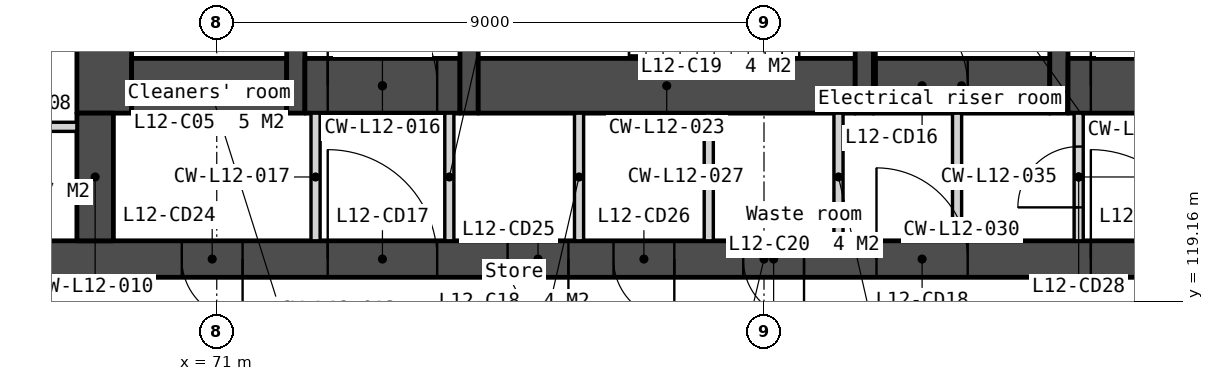
"""IFC4 building model, lengths in metres.
Left out: names, types, materials, properties, quantities, classifications, styles, units other than length and angle.
Written with IfcOpenShell. Run it as: python <this file> out.ifc"""

import sys

from ifc_helpers import new_model, si_unit, direction, frame, frame_2d, origin, place, context, subcontext, project, spatial, polyline, rectangle, outline, extrude, element, fill, save


model = new_model("IFC4")
c1 = context("Model", 3, precision=1e-05, world=origin(), true_north=direction((0.0, 1.0)))
c2 = subcontext(c1, "Body", "Model", "MODEL_VIEW")
j1 = project(units=[si_unit("LENGTHUNIT", "METRE"), si_unit("PLANEANGLEUNIT", "RADIAN")], contexts=[c1])
p1 = place(None, origin())
s1 = spatial("IfcSite", under=j1, at=p1, CompositionType="ELEMENT")
p2 = place(p1, origin())
s2 = spatial("IfcBuilding", under=s1, at=p2, CompositionType="ELEMENT")
p3 = place(p2, frame((0.0, 0.0, 56.0)))
s3 = spatial("IfcBuildingStorey", under=s2, at=p3, CompositionType="ELEMENT", Elevation=56.0)
p4 = place(p3, frame((66.0, 119.85, 0.0), z_axis=(0.0, 0.0, 1.0), x_axis=(1.0, 0.0, 0.0)))
e1 = element("IfcWall", 1, at=p4, inside=s3, PredefinedType="SOLIDWALL", context=c2, shape_type="SweptSolid", body=[
    extrude(rectangle(XDim=28.0, YDim=0.6, at=frame_2d((14.0, 0.0))), origin(), (0.0, 0.0, 1.0), 3.35),
])
p5 = place(p4, frame((6.825, 0.0, 0.0)))
e2 = element("IfcOpeningElement", 2, at=p5, cuts=e1, PredefinedType="OPENING", context=c2, shape_type="SweptSolid", body=[
    extrude(rectangle(XDim=1.8, YDim=2.1, at=frame_2d((0.9, 1.05))), frame((0.0, 0.31, 0.0), z_axis=(0.0, -1.0, 0.0), x_axis=(1.0, 0.0, 0.0)), (0.0, 0.0, 1.0), 0.62),
])
p6 = place(p4, frame((15.85, 0.0, 0.0)))
e3 = element("IfcOpeningElement", 3, at=p6, cuts=e1, PredefinedType="OPENING", context=c2, shape_type="SweptSolid", body=[
    extrude(rectangle(XDim=1.5, YDim=2.1, at=frame_2d((0.75, 1.05))), frame((0.0, 0.31, 0.0), z_axis=(0.0, -1.0, 0.0), x_axis=(1.0, 0.0, 0.0)), (0.0, 0.0, 1.0), 0.62),
])
p7 = place(p4, frame((19.375, 0.0, 0.0)))
e4 = element("IfcOpeningElement", 4, at=p7, cuts=e1, PredefinedType="OPENING", context=c2, shape_type="SweptSolid", body=[
    extrude(rectangle(XDim=1.8, YDim=2.1, at=frame_2d((0.9, 1.05))), frame((0.0, 0.31, 0.0), z_axis=(0.0, -1.0, 0.0), x_axis=(1.0, 0.0, 0.0)), (0.0, 0.0, 1.0), 0.62),
])
p8 = place(p4, frame((4.425, 0.0, 0.0)))
e5 = element("IfcOpeningElement", 5, at=p8, cuts=e1, PredefinedType="OPENING", context=c2, shape_type="SweptSolid", body=[
    extrude(rectangle(XDim=1.0, YDim=2.1, at=frame_2d((0.5, 1.05))), frame((0.0, 0.31, 0.0), z_axis=(0.0, -1.0, 0.0), x_axis=(1.0, 0.0, 0.0)), (0.0, 0.0, 1.0), 0.62),
])
p9 = place(p4, frame((9.783, 0.0, 0.0)))
e6 = element("IfcOpeningElement", 6, at=p9, cuts=e1, PredefinedType="OPENING", context=c2, shape_type="SweptSolid", body=[
    extrude(rectangle(XDim=1.0, YDim=2.1, at=frame_2d((0.5, 1.05))), frame((0.0, 0.31, 0.0), z_axis=(0.0, -1.0, 0.0), x_axis=(1.0, 0.0, 0.0)), (0.0, 0.0, 1.0), 0.62),
])
p10 = place(p4, frame((11.525, 0.0, 0.0)))
e7 = element("IfcOpeningElement", 7, at=p10, cuts=e1, PredefinedType="OPENING", context=c2, shape_type="SweptSolid", body=[
    extrude(rectangle(XDim=1.0, YDim=2.1, at=frame_2d((0.5, 1.05))), frame((0.0, 0.31, 0.0), z_axis=(0.0, -1.0, 0.0), x_axis=(1.0, 0.0, 0.0)), (0.0, 0.0, 1.0), 0.62),
])
p11 = place(p4, frame((13.658, 0.0, 0.0)))
e8 = element("IfcOpeningElement", 8, at=p11, cuts=e1, PredefinedType="OPENING", context=c2, shape_type="SweptSolid", body=[
    extrude(rectangle(XDim=1.0, YDim=2.1, at=frame_2d((0.5, 1.05))), frame((0.0, 0.31, 0.0), z_axis=(0.0, -1.0, 0.0), x_axis=(1.0, 0.0, 0.0)), (0.0, 0.0, 1.0), 0.62),
])
p12 = place(p4, frame((21.725, 0.0, 0.0)))
e9 = element("IfcOpeningElement", 9, at=p12, cuts=e1, PredefinedType="OPENING", context=c2, shape_type="SweptSolid", body=[
    extrude(rectangle(XDim=1.0, YDim=2.1, at=frame_2d((0.5, 1.05))), frame((0.0, 0.31, 0.0), z_axis=(0.0, -1.0, 0.0), x_axis=(1.0, 0.0, 0.0)), (0.0, 0.0, 1.0), 0.62),
])
p13 = place(p4, frame((23.425, 0.0, 0.0)))
e10 = element("IfcOpeningElement", 10, at=p13, cuts=e1, PredefinedType="OPENING", context=c2, shape_type="SweptSolid", body=[
    extrude(rectangle(XDim=1.0, YDim=2.1, at=frame_2d((0.5, 1.05))), frame((0.0, 0.31, 0.0), z_axis=(0.0, -1.0, 0.0), x_axis=(1.0, 0.0, 0.0)), (0.0, 0.0, 1.0), 0.62),
])
p14 = place(p3, frame((66.6, 122.025, 0.0), z_axis=(0.0, 0.0, 1.0), x_axis=(1.0, 0.0, 0.0)))
e11 = element("IfcWall", 11, at=p14, inside=s3, PredefinedType="PARTITIONING", context=c2, shape_type="SweptSolid", body=[
    extrude(rectangle(XDim=2.1, YDim=0.15, at=frame_2d((1.05, 0.0))), origin(), (0.0, 0.0, 1.0), 3.35),
])
p15 = place(p3, frame((69.15, 133.95, 0.0), z_axis=(0.0, 0.0, 1.0), x_axis=(0.0, -1.0, 0.0)))
e12 = element("IfcWall", 12, at=p15, inside=s3, PredefinedType="SOLIDWALL", context=c2, shape_type="SweptSolid", body=[
    extrude(rectangle(XDim=11.7, YDim=0.9, at=frame_2d((5.85, 0.0))), origin(), (0.0, 0.0, 1.0), 3.35),
])
p16 = place(p3, frame((69.0, 122.25, 0.0), z_axis=(0.0, 0.0, 1.0), x_axis=(0.0, -1.0, 0.0)))
e13 = element("IfcWall", 13, at=p16, inside=s3, PredefinedType="SOLIDWALL", context=c2, shape_type="SweptSolid", body=[
    extrude(rectangle(XDim=2.1, YDim=0.6, at=frame_2d((1.05, 0.0))), origin(), (0.0, 0.0, 1.0), 3.35),
])
p17 = place(p3, frame((69.6, 122.7, 0.0), z_axis=(0.0, 0.0, 1.0), x_axis=(1.0, 0.0, 0.0)))
e14 = element("IfcWall", 14, at=p17, inside=s3, PredefinedType="SOLIDWALL", context=c2, shape_type="SweptSolid", body=[
    extrude(rectangle(XDim=2.55, YDim=0.9, at=frame_2d((1.275, 0.0))), origin(), (0.0, 0.0, 1.0), 3.35),
])
p18 = place(p3, frame((72.3, 133.95, 0.0), z_axis=(0.0, 0.0, 1.0), x_axis=(0.0, -1.0, 0.0)))
e15 = element("IfcWall", 15, at=p18, inside=s3, PredefinedType="SOLIDWALL", context=c2, shape_type="SweptSolid", body=[
    extrude(rectangle(XDim=11.7, YDim=0.3, at=frame_2d((5.85, 0.0))), origin(), (0.0, 0.0, 1.0), 3.35),
])
p19 = place(p18, frame((6.95, 0.0, 0.0)))
e16 = element("IfcOpeningElement", 16, at=p19, cuts=e15, PredefinedType="OPENING", context=c2, shape_type="SweptSolid", body=[
    extrude(rectangle(XDim=1.1, YDim=2.1, at=frame_2d((0.55, 1.05))), frame((0.0, 0.16, 0.0), z_axis=(0.0, -1.0, 0.0), x_axis=(1.0, 0.0, 0.0)), (0.0, 0.0, 1.0), 0.32),
])
p20 = place(p18, frame((9.35, 0.0, 0.0)))
e17 = element("IfcOpeningElement", 17, at=p20, cuts=e15, PredefinedType="OPENING", context=c2, shape_type="SweptSolid", body=[
    extrude(rectangle(XDim=0.9, YDim=2.1, at=frame_2d((0.45, 1.05))), frame((0.0, 0.16, 0.0), z_axis=(0.0, -1.0, 0.0), x_axis=(1.0, 0.0, 0.0)), (0.0, 0.0, 1.0), 0.32),
])
p21 = place(p18, frame((5.1, 0.0, 0.0)))
e18 = element("IfcOpeningElement", 18, at=p21, cuts=e15, PredefinedType="OPENING", context=c2, shape_type="SweptSolid", body=[
    extrude(rectangle(XDim=1.0, YDim=2.1, at=frame_2d((0.5, 1.05))), frame((0.0, 0.16, 0.0), z_axis=(0.0, -1.0, 0.0), x_axis=(1.0, 0.0, 0.0)), (0.0, 0.0, 1.0), 0.32),
])
p22 = place(p3, frame((72.45, 122.7, 0.0), z_axis=(0.0, 0.0, 1.0), x_axis=(1.0, 0.0, 0.0)))
e19 = element("IfcWall", 19, at=p22, inside=s3, PredefinedType="SOLIDWALL", context=c2, shape_type="SweptSolid", body=[
    extrude(rectangle(XDim=2.55, YDim=0.9, at=frame_2d((1.275, 0.0))), origin(), (0.0, 0.0, 1.0), 3.35),
])
p23 = place(p22, frame((0.375, 0.0, 0.0)))
e20 = element("IfcOpeningElement", 20, at=p23, cuts=e19, PredefinedType="OPENING", context=c2, shape_type="SweptSolid", body=[
    extrude(rectangle(XDim=1.8, YDim=2.1, at=frame_2d((0.9, 1.05))), frame((0.0, 0.46, 0.0), z_axis=(0.0, -1.0, 0.0), x_axis=(1.0, 0.0, 0.0)), (0.0, 0.0, 1.0), 0.92),
])
for number, where, z_axis, x_axis in (
    (21, (72.625, 122.25, 0.0), (0.0, 0.0, 1.0), (0.0, -1.0, 0.0)),
    (22, (74.825, 122.25, 0.0), (0.0, 0.0, 1.0), (0.0, -1.0, 0.0)),
):
    element("IfcWall", number, at=place(p3, frame(where, z_axis=z_axis, x_axis=x_axis)), inside=s3, PredefinedType="PARTITIONING", context=c2, shape_type="SweptSolid", body=[
        extrude(rectangle(XDim=2.1, YDim=0.15, at=frame_2d((1.05, 0.0))), origin(), (0.0, 0.0, 1.0), 3.35),
    ])
p24 = place(p3, frame((75.15, 133.95, 0.0), z_axis=(0.0, 0.0, 1.0), x_axis=(0.0, -1.0, 0.0)))
e23 = element("IfcWall", 23, at=p24, inside=s3, PredefinedType="SOLIDWALL", context=c2, shape_type="SweptSolid", body=[
    extrude(rectangle(XDim=11.7, YDim=0.3, at=frame_2d((5.85, 0.0))), origin(), (0.0, 0.0, 1.0), 3.35),
])
p25 = place(p3, frame((75.3, 122.7, 0.0), z_axis=(0.0, 0.0, 1.0), x_axis=(1.0, 0.0, 0.0)))
e24 = element("IfcWall", 24, at=p25, inside=s3, PredefinedType="SOLIDWALL", context=c2, shape_type="SweptSolid", body=[
    extrude(rectangle(XDim=6.2, YDim=0.9, at=frame_2d((3.1, 0.0))), origin(), (0.0, 0.0, 1.0), 3.35),
])
for number, where, z_axis, x_axis in (
    (25, (76.958, 122.25, 0.0), (0.0, 0.0, 1.0), (0.0, -1.0, 0.0)),
    (26, (79.092, 122.25, 0.0), (0.0, 0.0, 1.0), (0.0, -1.0, 0.0)),
    (27, (81.225, 122.25, 0.0), (0.0, 0.0, 1.0), (0.0, -1.0, 0.0)),
):
    element("IfcWall", number, at=place(p3, frame(where, z_axis=z_axis, x_axis=x_axis)), inside=s3, PredefinedType="PARTITIONING", context=c2, shape_type="SweptSolid", body=[
        extrude(rectangle(XDim=2.1, YDim=0.15, at=frame_2d((1.05, 0.0))), origin(), (0.0, 0.0, 1.0), 3.35),
    ])
p26 = place(p3, frame((81.65, 125.7, 0.0), z_axis=(0.0, 0.0, 1.0), x_axis=(0.0, -1.0, 0.0)))
e28 = element("IfcWall", 28, at=p26, inside=s3, PredefinedType="SOLIDWALL", context=c2, shape_type="SweptSolid", body=[
    extrude(rectangle(XDim=3.45, YDim=0.3, at=frame_2d((1.725, 0.0))), origin(), (0.0, 0.0, 1.0), 3.35),
])
p27 = place(p26, frame((0.75, 0.0, 0.0)))
e29 = element("IfcOpeningElement", 29, at=p27, cuts=e28, PredefinedType="OPENING", context=c2, shape_type="SweptSolid", body=[
    extrude(rectangle(XDim=1.0, YDim=2.1, at=frame_2d((0.5, 1.05))), frame((0.0, 0.16, 0.0), z_axis=(0.0, -1.0, 0.0), x_axis=(1.0, 0.0, 0.0)), (0.0, 0.0, 1.0), 0.32),
])
p28 = place(p3, frame((81.8, 122.7, 0.0), z_axis=(0.0, 0.0, 1.0), x_axis=(1.0, 0.0, 0.0)))
e30 = element("IfcWall", 30, at=p28, inside=s3, PredefinedType="SOLIDWALL", context=c2, shape_type="SweptSolid", body=[
    extrude(rectangle(XDim=2.9, YDim=0.9, at=frame_2d((1.45, 0.0))), origin(), (0.0, 0.0, 1.0), 3.35),
])
p29 = place(p28, frame((0.05, 0.0, 0.0)))
e31 = element("IfcOpeningElement", 31, at=p29, cuts=e30, PredefinedType="OPENING", context=c2, shape_type="SweptSolid", body=[
    extrude(rectangle(XDim=1.5, YDim=2.1, at=frame_2d((0.75, 1.05))), frame((0.0, 0.46, 0.0), z_axis=(0.0, -1.0, 0.0), x_axis=(1.0, 0.0, 0.0)), (0.0, 0.0, 1.0), 0.92),
])
p30 = place(p3, frame((83.175, 122.25, 0.0), z_axis=(0.0, 0.0, 1.0), x_axis=(0.0, -1.0, 0.0)))
e32 = element("IfcWall", 32, at=p30, inside=s3, PredefinedType="PARTITIONING", context=c2, shape_type="SweptSolid", body=[
    extrude(rectangle(XDim=2.1, YDim=0.15, at=frame_2d((1.05, 0.0))), origin(), (0.0, 0.0, 1.0), 3.35),
])
p31 = place(p3, frame((84.85, 133.95, 0.0), z_axis=(0.0, 0.0, 1.0), x_axis=(0.0, -1.0, 0.0)))
e33 = element("IfcWall", 33, at=p31, inside=s3, PredefinedType="SOLIDWALL", context=c2, shape_type="SweptSolid", body=[
    extrude(rectangle(XDim=11.7, YDim=0.3, at=frame_2d((5.85, 0.0))), origin(), (0.0, 0.0, 1.0), 3.35),
])
p32 = place(p3, frame((85.0, 122.7, 0.0), z_axis=(0.0, 0.0, 1.0), x_axis=(1.0, 0.0, 0.0)))
e34 = element("IfcWall", 34, at=p32, inside=s3, PredefinedType="SOLIDWALL", context=c2, shape_type="SweptSolid", body=[
    extrude(rectangle(XDim=2.55, YDim=0.9, at=frame_2d((1.275, 0.0))), origin(), (0.0, 0.0, 1.0), 3.35),
])
p33 = place(p32, frame((0.375, 0.0, 0.0)))
e35 = element("IfcOpeningElement", 35, at=p33, cuts=e34, PredefinedType="OPENING", context=c2, shape_type="SweptSolid", body=[
    extrude(rectangle(XDim=1.8, YDim=2.1, at=frame_2d((0.9, 1.05))), frame((0.0, 0.46, 0.0), z_axis=(0.0, -1.0, 0.0), x_axis=(1.0, 0.0, 0.0)), (0.0, 0.0, 1.0), 0.92),
])
p34 = place(p3, frame((85.175, 122.25, 0.0), z_axis=(0.0, 0.0, 1.0), x_axis=(0.0, -1.0, 0.0)))
e36 = element("IfcWall", 36, at=p34, inside=s3, PredefinedType="PARTITIONING", context=c2, shape_type="SweptSolid", body=[
    extrude(rectangle(XDim=2.1, YDim=0.15, at=frame_2d((1.05, 0.0))), origin(), (0.0, 0.0, 1.0), 3.35),
])
p35 = place(p34, frame((0.55, 0.0, 0.0)))
e37 = element("IfcOpeningElement", 37, at=p35, cuts=e36, PredefinedType="OPENING", context=c2, shape_type="SweptSolid", body=[
    extrude(rectangle(XDim=1.0, YDim=2.1, at=frame_2d((0.5, 1.05))), frame((0.0, 0.085, 0.0), z_axis=(0.0, -1.0, 0.0), x_axis=(1.0, 0.0, 0.0)), (0.0, 0.0, 1.0), 0.17),
])
p36 = place(p3, frame((83.105, 90.599, -0.15), z_axis=(0.0, 0.0, 1.0), x_axis=(0.499999201451, 0.866025864826, 0.0)))
e38 = element("IfcWall", 38, at=p36, inside=s3, PredefinedType="SOLIDWALL", context=c2, shape_type="SweptSolid", body=[
    extrude(outline(polyline([(44.8, 0.0), (44.8, 3.5), (0.0, 3.5), (0.0, 0.0), (44.8, 0.0)])), frame((0.0, 0.225, 0.0), z_axis=(0.0, -1.0, 0.0), x_axis=(1.0, 0.0, 0.0)), (0.0, 0.0, 1.0), 0.45),
])
p37 = place(p36, frame((0.786, 0.0, 1.05)))
e39 = element("IfcOpeningElement", 39, at=p37, cuts=e38, PredefinedType="OPENING", context=c2, shape_type="SweptSolid", body=[
    extrude(rectangle(XDim=1.2, YDim=1.5, at=frame_2d((0.6, 0.75))), frame((0.0, 0.235, 0.0), z_axis=(0.0, -1.0, 0.0), x_axis=(1.0, 0.0, 0.0)), (0.0, 0.0, 1.0), 0.47),
])
p38 = place(p36, frame((6.91, 0.0, 1.05)))
e40 = element("IfcOpeningElement", 40, at=p38, cuts=e38, PredefinedType="OPENING", context=c2, shape_type="SweptSolid", body=[
    extrude(rectangle(XDim=1.8, YDim=1.5, at=frame_2d((0.9, 0.75))), frame((0.0, 0.235, 0.0), z_axis=(0.0, -1.0, 0.0), x_axis=(1.0, 0.0, 0.0)), (0.0, 0.0, 1.0), 0.47),
])
p39 = place(p36, frame((9.21, 0.0, 1.05)))
e41 = element("IfcOpeningElement", 41, at=p39, cuts=e38, PredefinedType="OPENING", context=c2, shape_type="SweptSolid", body=[
    extrude(rectangle(XDim=1.8, YDim=1.5, at=frame_2d((0.9, 0.75))), frame((0.0, 0.235, 0.0), z_axis=(0.0, -1.0, 0.0), x_axis=(1.0, 0.0, 0.0)), (0.0, 0.0, 1.0), 0.47),
])
p40 = place(p36, frame((15.87, 0.0, 1.05)))
e42 = element("IfcOpeningElement", 42, at=p40, cuts=e38, PredefinedType="OPENING", context=c2, shape_type="SweptSolid", body=[
    extrude(rectangle(XDim=1.8, YDim=1.5, at=frame_2d((0.9, 0.75))), frame((0.0, 0.235, 0.0), z_axis=(0.0, -1.0, 0.0), x_axis=(1.0, 0.0, 0.0)), (0.0, 0.0, 1.0), 0.47),
])
p41 = place(p36, frame((18.17, 0.0, 1.05)))
e43 = element("IfcOpeningElement", 43, at=p41, cuts=e38, PredefinedType="OPENING", context=c2, shape_type="SweptSolid", body=[
    extrude(rectangle(XDim=1.8, YDim=1.5, at=frame_2d((0.9, 0.75))), frame((0.0, 0.235, 0.0), z_axis=(0.0, -1.0, 0.0), x_axis=(1.0, 0.0, 0.0)), (0.0, 0.0, 1.0), 0.47),
])
p42 = place(p36, frame((24.83, 0.0, 1.05)))
e44 = element("IfcOpeningElement", 44, at=p42, cuts=e38, PredefinedType="OPENING", context=c2, shape_type="SweptSolid", body=[
    extrude(rectangle(XDim=1.8, YDim=1.5, at=frame_2d((0.9, 0.75))), frame((0.0, 0.235, 0.0), z_axis=(0.0, -1.0, 0.0), x_axis=(1.0, 0.0, 0.0)), (0.0, 0.0, 1.0), 0.47),
])
p43 = place(p36, frame((27.13, 0.0, 1.05)))
e45 = element("IfcOpeningElement", 45, at=p43, cuts=e38, PredefinedType="OPENING", context=c2, shape_type="SweptSolid", body=[
    extrude(rectangle(XDim=1.8, YDim=1.5, at=frame_2d((0.9, 0.75))), frame((0.0, 0.235, 0.0), z_axis=(0.0, -1.0, 0.0), x_axis=(1.0, 0.0, 0.0)), (0.0, 0.0, 1.0), 0.47),
])
p44 = place(p36, frame((33.79, 0.0, 1.05)))
e46 = element("IfcOpeningElement", 46, at=p44, cuts=e38, PredefinedType="OPENING", context=c2, shape_type="SweptSolid", body=[
    extrude(rectangle(XDim=1.8, YDim=1.5, at=frame_2d((0.9, 0.75))), frame((0.0, 0.235, 0.0), z_axis=(0.0, -1.0, 0.0), x_axis=(1.0, 0.0, 0.0)), (0.0, 0.0, 1.0), 0.47),
])
p45 = place(p36, frame((36.09, 0.0, 1.05)))
e47 = element("IfcOpeningElement", 47, at=p45, cuts=e38, PredefinedType="OPENING", context=c2, shape_type="SweptSolid", body=[
    extrude(rectangle(XDim=1.8, YDim=1.5, at=frame_2d((0.9, 0.75))), frame((0.0, 0.235, 0.0), z_axis=(0.0, -1.0, 0.0), x_axis=(1.0, 0.0, 0.0)), (0.0, 0.0, 1.0), 0.47),
])
p46 = place(p36, frame((42.814, 0.0, 1.05)))
e48 = element("IfcOpeningElement", 48, at=p46, cuts=e38, PredefinedType="OPENING", context=c2, shape_type="SweptSolid", body=[
    extrude(rectangle(XDim=1.2, YDim=1.5, at=frame_2d((0.6, 0.75))), frame((0.0, 0.235, 0.0), z_axis=(0.0, -1.0, 0.0), x_axis=(1.0, 0.0, 0.0)), (0.0, 0.0, 1.0), 0.47),
])
p47 = place(p33, origin())
e49 = element("IfcDoor", 49, at=p47, inside=s3, OperationType="DOUBLE_DOOR_DOUBLE_SWING", PredefinedType="DOOR", context=c2, shape_type="SweptSolid", body=[
    extrude(rectangle(XDim=1.8, YDim=2.1, at=frame_2d((0.9, 1.05))), frame((0.0, 0.025, 0.0), z_axis=(0.0, -1.0, 0.0), x_axis=(1.0, 0.0, 0.0)), (0.0, 0.0, 1.0), 0.05),
])
fill(e35, e49)
p48 = place(p23, origin())
e50 = element("IfcDoor", 50, at=p48, inside=s3, OperationType="DOUBLE_DOOR_DOUBLE_SWING", PredefinedType="DOOR", context=c2, shape_type="SweptSolid", body=[
    extrude(rectangle(XDim=1.8, YDim=2.1, at=frame_2d((0.9, 1.05))), frame((0.0, 0.025, 0.0), z_axis=(0.0, -1.0, 0.0), x_axis=(1.0, 0.0, 0.0)), (0.0, 0.0, 1.0), 0.05),
])
fill(e20, e50)
p49 = place(p29, origin())
e51 = element("IfcDoor", 51, at=p49, inside=s3, OperationType="DOUBLE_DOOR_DOUBLE_SWING", PredefinedType="DOOR", context=c2, shape_type="SweptSolid", body=[
    extrude(rectangle(XDim=1.5, YDim=2.1, at=frame_2d((0.75, 1.05))), frame((0.0, 0.025, 0.0), z_axis=(0.0, -1.0, 0.0), x_axis=(1.0, 0.0, 0.0)), (0.0, 0.0, 1.0), 0.05),
])
fill(e31, e51)
p50 = place(p5, origin())
e52 = element("IfcDoor", 52, at=p50, inside=s3, OperationType="DOUBLE_DOOR_DOUBLE_SWING", PredefinedType="DOOR", context=c2, shape_type="SweptSolid", body=[
    extrude(rectangle(XDim=1.8, YDim=2.1, at=frame_2d((0.9, 1.05))), frame((0.0, 0.025, 0.0), z_axis=(0.0, -1.0, 0.0), x_axis=(1.0, 0.0, 0.0)), (0.0, 0.0, 1.0), 0.05),
])
fill(e2, e52)
p51 = place(p6, origin())
e53 = element("IfcDoor", 53, at=p51, inside=s3, OperationType="DOUBLE_DOOR_DOUBLE_SWING", PredefinedType="DOOR", context=c2, shape_type="SweptSolid", body=[
    extrude(rectangle(XDim=1.5, YDim=2.1, at=frame_2d((0.75, 1.05))), frame((0.0, 0.025, 0.0), z_axis=(0.0, -1.0, 0.0), x_axis=(1.0, 0.0, 0.0)), (0.0, 0.0, 1.0), 0.05),
])
fill(e3, e53)
p52 = place(p7, origin())
e54 = element("IfcDoor", 54, at=p52, inside=s3, OperationType="DOUBLE_DOOR_DOUBLE_SWING", PredefinedType="DOOR", context=c2, shape_type="SweptSolid", body=[
    extrude(rectangle(XDim=1.8, YDim=2.1, at=frame_2d((0.9, 1.05))), frame((0.0, 0.025, 0.0), z_axis=(0.0, -1.0, 0.0), x_axis=(1.0, 0.0, 0.0)), (0.0, 0.0, 1.0), 0.05),
])
fill(e4, e54)
p53 = place(p8, origin())
e55 = element("IfcDoor", 55, at=p53, inside=s3, OperationType="SINGLE_SWING_RIGHT", PredefinedType="DOOR", context=c2, shape_type="SweptSolid", body=[
    extrude(rectangle(XDim=1.0, YDim=2.1, at=frame_2d((0.5, 1.05))), frame((0.0, 0.025, 0.0), z_axis=(0.0, -1.0, 0.0), x_axis=(1.0, 0.0, 0.0)), (0.0, 0.0, 1.0), 0.05),
])
fill(e5, e55)
p54 = place(p9, origin())
e56 = element("IfcDoor", 56, at=p54, inside=s3, OperationType="SINGLE_SWING_RIGHT", PredefinedType="DOOR", context=c2, shape_type="SweptSolid", body=[
    extrude(rectangle(XDim=1.0, YDim=2.1, at=frame_2d((0.5, 1.05))), frame((0.0, 0.025, 0.0), z_axis=(0.0, -1.0, 0.0), x_axis=(1.0, 0.0, 0.0)), (0.0, 0.0, 1.0), 0.05),
])
fill(e6, e56)
p55 = place(p10, origin())
e57 = element("IfcDoor", 57, at=p55, inside=s3, OperationType="SINGLE_SWING_RIGHT", PredefinedType="DOOR", context=c2, shape_type="SweptSolid", body=[
    extrude(rectangle(XDim=1.0, YDim=2.1, at=frame_2d((0.5, 1.05))), frame((0.0, 0.025, 0.0), z_axis=(0.0, -1.0, 0.0), x_axis=(1.0, 0.0, 0.0)), (0.0, 0.0, 1.0), 0.05),
])
fill(e7, e57)
p56 = place(p11, origin())
e58 = element("IfcDoor", 58, at=p56, inside=s3, OperationType="SINGLE_SWING_RIGHT", PredefinedType="DOOR", context=c2, shape_type="SweptSolid", body=[
    extrude(rectangle(XDim=1.0, YDim=2.1, at=frame_2d((0.5, 1.05))), frame((0.0, 0.025, 0.0), z_axis=(0.0, -1.0, 0.0), x_axis=(1.0, 0.0, 0.0)), (0.0, 0.0, 1.0), 0.05),
])
fill(e8, e58)
p57 = place(p35, origin())
e59 = element("IfcDoor", 59, at=p57, inside=s3, OperationType="SINGLE_SWING_RIGHT", PredefinedType="DOOR", context=c2, shape_type="SweptSolid", body=[
    extrude(rectangle(XDim=1.0, YDim=2.1, at=frame_2d((0.5, 1.05))), frame((0.0, 0.025, 0.0), z_axis=(0.0, -1.0, 0.0), x_axis=(1.0, 0.0, 0.0)), (0.0, 0.0, 1.0), 0.05),
])
fill(e37, e59)
save(model, sys.argv[1])
